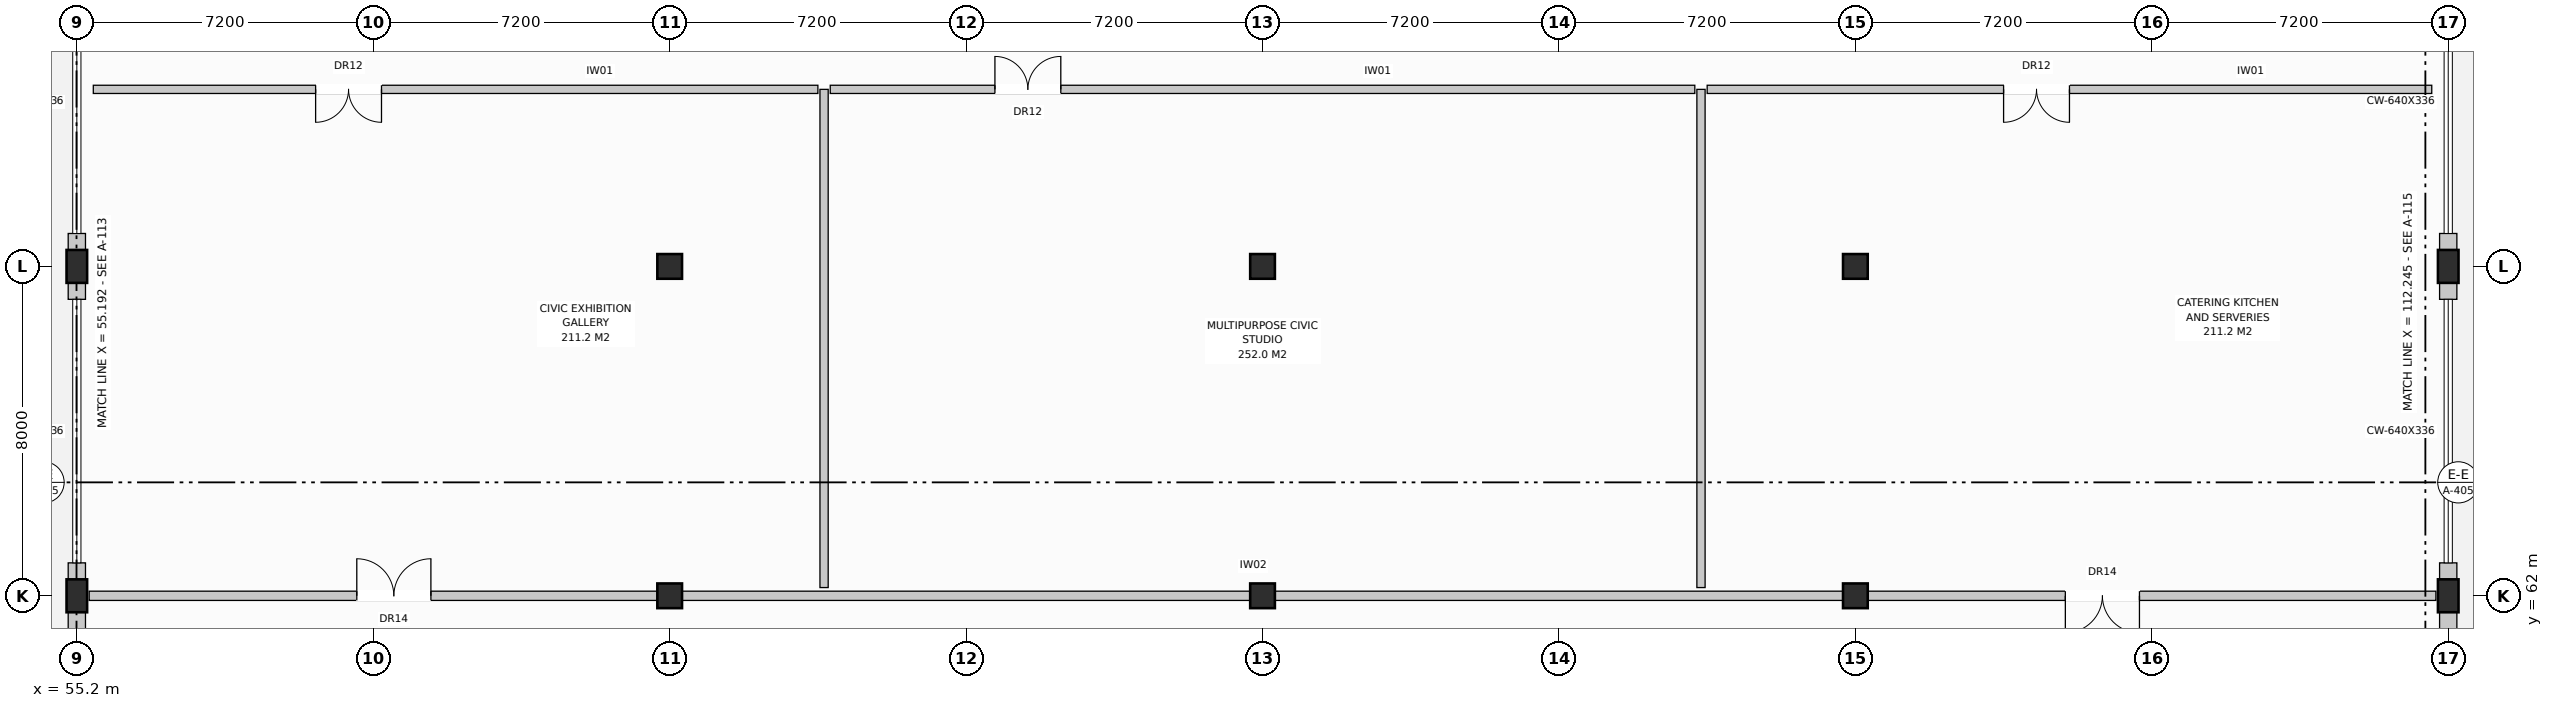
"""IFC4 building model, lengths in metres.
Left out: names, types, materials, properties, quantities, classifications, styles, units other than length and angle.
Written with IfcOpenShell. Run it as: python <this file> out.ifc"""

import sys

from ifc_helpers import new_model, si_unit, direction, frame, frame_2d, origin, origin_with_axes, origin_2d, place, context, subcontext, project, spatial, rectangle, circle, extrude, element, fill, save


model = new_model("IFC4")
c1 = context("Model", 3, precision=1e-05, world=origin(), true_north=direction((0.0, 1.0)))
c2 = subcontext(c1, "Body", "Model", "MODEL_VIEW")
j1 = project(units=[si_unit("LENGTHUNIT", "METRE"), si_unit("PLANEANGLEUNIT", "RADIAN")], contexts=[c1])
p1 = place(None, origin())
s1 = spatial("IfcSite", under=j1, at=p1, CompositionType="ELEMENT")
p2 = place(p1, origin())
s2 = spatial("IfcBuilding", under=s1, at=p2, CompositionType="ELEMENT")
p3 = place(p2, origin())
s3 = spatial("IfcBuildingStorey", under=s2, at=p3, CompositionType="ELEMENT", Elevation=0.0)
for number, where, z_axis, x_axis in (
    (1, (55.2, 62.0, 0.0), (0.0, 0.0, 1.0), (1.0, 0.0, 0.0)),
    (2, (55.2, 70.0, 0.0), (0.0, 0.0, 1.0), (1.0, 0.0, 0.0)),
):
    element("IfcColumn", number, at=place(p3, frame(where, z_axis=z_axis, x_axis=x_axis)), inside=s3, PredefinedType="COLUMN", context=c2, shape_type="SweptSolid", body=[
        extrude(rectangle(XDim=0.5, YDim=0.8, at=origin_2d()), origin(), (0.0, 0.0, 1.0), 4.4),
    ])
for number, where, z_axis, x_axis in (
    (3, (69.6, 62.0, 0.0), (0.0, 0.0, 1.0), (1.0, 0.0, 0.0)),
    (4, (69.6, 70.0, 0.0), (0.0, 0.0, 1.0), (1.0, 0.0, 0.0)),
):
    element("IfcColumn", number, at=place(p3, frame(where, z_axis=z_axis, x_axis=x_axis)), inside=s3, PredefinedType="COLUMN", context=c2, shape_type="SweptSolid", body=[
        extrude(circle(Radius=0.3, at=origin_2d()), origin(), (0.0, 0.0, 1.0), 4.4),
    ])
for number, where, z_axis, x_axis in (
    (5, (84.0, 62.0, 0.0), (0.0, 0.0, 1.0), (1.0, 0.0, 0.0)),
    (6, (84.0, 70.0, 0.0), (0.0, 0.0, 1.0), (1.0, 0.0, 0.0)),
):
    element("IfcColumn", number, at=place(p3, frame(where, z_axis=z_axis, x_axis=x_axis)), inside=s3, PredefinedType="COLUMN", context=c2, shape_type="SweptSolid", body=[
        extrude(rectangle(XDim=0.6, YDim=0.6, at=origin_2d()), origin(), (0.0, 0.0, 1.0), 4.4),
    ])
for number, where, z_axis, x_axis in (
    (7, (98.4, 62.0, 0.0), (0.0, 0.0, 1.0), (1.0, 0.0, 0.0)),
    (8, (98.4, 70.0, 0.0), (0.0, 0.0, 1.0), (1.0, 0.0, 0.0)),
):
    element("IfcColumn", number, at=place(p3, frame(where, z_axis=z_axis, x_axis=x_axis)), inside=s3, PredefinedType="COLUMN", context=c2, shape_type="SweptSolid", body=[
        extrude(circle(Radius=0.3, at=origin_2d()), origin(), (0.0, 0.0, 1.0), 4.4),
    ])
for number, where, z_axis, x_axis in (
    (9, (112.8, 62.0, 0.0), (0.0, 0.0, 1.0), (1.0, 0.0, 0.0)),
    (10, (112.8, 70.0, 0.0), (0.0, 0.0, 1.0), (1.0, 0.0, 0.0)),
):
    element("IfcColumn", number, at=place(p3, frame(where, z_axis=z_axis, x_axis=x_axis)), inside=s3, PredefinedType="COLUMN", context=c2, shape_type="SweptSolid", body=[
        extrude(rectangle(XDim=0.5, YDim=0.8, at=origin_2d()), origin(), (0.0, 0.0, 1.0), 4.4),
    ])
p4 = place(p3, frame((55.2, 53.2, 0.0), z_axis=(0.0, 0.0, 1.0), x_axis=(0.0, 1.0, 0.0)))
e11 = element("IfcWall", 11, at=p4, inside=s3, PredefinedType="STANDARD", context=c2, shape_type="SweptSolid", body=[
    extrude(rectangle(XDim=8.8, YDim=0.42, at=frame_2d((4.4, 0.0))), origin(), (0.0, 0.0, 1.0), 3.36),
])
p5 = place(p4, frame((3.8, 0.0, 0.0)))
e12 = element("IfcOpeningElement", 12, at=p5, cuts=e11, PredefinedType="OPENING", context=c2, shape_type="SweptSolid", body=[
    extrude(rectangle(XDim=2.0, YDim=2.45, at=frame_2d((1.0, 1.225))), frame((0.0, 0.222, 0.0), z_axis=(0.0, -1.0, 0.0), x_axis=(1.0, 0.0, 0.0)), (0.0, 0.0, 1.0), 0.444),
])
p6 = place(p3, frame((55.2, 62.0, 0.0), z_axis=(0.0, 0.0, 1.0), x_axis=(0.0, 1.0, 0.0)))
e13 = element("IfcWall", 13, at=p6, inside=s3, PredefinedType="STANDARD", context=c2, shape_type="SweptSolid", body=[
    extrude(rectangle(XDim=0.8, YDim=0.42, at=frame_2d((0.4, 0.0))), origin(), (0.0, 0.0, 1.0), 3.36),
])
p7 = place(p3, frame((55.2, 69.2, 0.0), z_axis=(0.0, 0.0, 1.0), x_axis=(0.0, 1.0, 0.0)))
e14 = element("IfcWall", 14, at=p7, inside=s3, PredefinedType="STANDARD", context=c2, shape_type="SweptSolid", body=[
    extrude(rectangle(XDim=1.6, YDim=0.42, at=frame_2d((0.8, 0.0))), origin(), (0.0, 0.0, 1.0), 3.36),
])
p8 = place(p3, frame((112.8, 53.2, 0.0), z_axis=(0.0, 0.0, 1.0), x_axis=(0.0, 1.0, 0.0)))
e15 = element("IfcWall", 15, at=p8, inside=s3, PredefinedType="STANDARD", context=c2, shape_type="SweptSolid", body=[
    extrude(rectangle(XDim=8.8, YDim=0.42, at=frame_2d((4.4, 0.0))), origin(), (0.0, 0.0, 1.0), 3.36),
])
p9 = place(p8, frame((3.8, 0.0, 0.0)))
e16 = element("IfcOpeningElement", 16, at=p9, cuts=e15, PredefinedType="OPENING", context=c2, shape_type="SweptSolid", body=[
    extrude(rectangle(XDim=2.0, YDim=2.45, at=frame_2d((1.0, 1.225))), frame((0.0, 0.222, 0.0), z_axis=(0.0, -1.0, 0.0), x_axis=(1.0, 0.0, 0.0)), (0.0, 0.0, 1.0), 0.444),
])
p10 = place(p3, frame((112.8, 62.0, 0.0), z_axis=(0.0, 0.0, 1.0), x_axis=(0.0, 1.0, 0.0)))
e17 = element("IfcWall", 17, at=p10, inside=s3, PredefinedType="STANDARD", context=c2, shape_type="SweptSolid", body=[
    extrude(rectangle(XDim=0.8, YDim=0.42, at=frame_2d((0.4, 0.0))), origin(), (0.0, 0.0, 1.0), 3.36),
])
p11 = place(p3, frame((112.8, 69.2, 0.0), z_axis=(0.0, 0.0, 1.0), x_axis=(0.0, 1.0, 0.0)))
e18 = element("IfcWall", 18, at=p11, inside=s3, PredefinedType="STANDARD", context=c2, shape_type="SweptSolid", body=[
    extrude(rectangle(XDim=1.6, YDim=0.42, at=frame_2d((0.8, 0.0))), origin(), (0.0, 0.0, 1.0), 3.36),
])
p12 = place(p3, frame((55.6, 74.3, 0.0), z_axis=(0.0, 0.0, 1.0), x_axis=(1.0, 0.0, 0.0)))
e19 = element("IfcWall", 19, at=p12, inside=s3, PredefinedType="PARTITIONING", context=c2, shape_type="SweptSolid", body=[
    extrude(rectangle(XDim=17.6, YDim=0.2, at=frame_2d((8.8, 0.0))), origin(), (0.0, 0.0, 1.0), 4.12),
])
p13 = place(p12, frame((5.4, 0.0, 0.0)))
e20 = element("IfcOpeningElement", 20, at=p13, cuts=e19, PredefinedType="OPENING", context=c2, shape_type="SweptSolid", body=[
    extrude(rectangle(XDim=1.6, YDim=2.2, at=frame_2d((0.8, 1.1))), frame((0.0, 0.112, 0.0), z_axis=(0.0, -1.0, 0.0), x_axis=(1.0, 0.0, 0.0)), (0.0, 0.0, 1.0), 0.224),
])
p14 = place(p3, frame((73.5, 74.3, 0.0), z_axis=(0.0, 0.0, 1.0), x_axis=(1.0, 0.0, 0.0)))
e21 = element("IfcWall", 21, at=p14, inside=s3, PredefinedType="PARTITIONING", context=c2, shape_type="SweptSolid", body=[
    extrude(rectangle(XDim=21.0, YDim=0.2, at=frame_2d((10.5, 0.0))), origin(), (0.0, 0.0, 1.0), 4.12),
])
p15 = place(p14, frame((4.0, 0.0, 0.0)))
e22 = element("IfcOpeningElement", 22, at=p15, cuts=e21, PredefinedType="OPENING", context=c2, shape_type="SweptSolid", body=[
    extrude(rectangle(XDim=1.6, YDim=2.2, at=frame_2d((0.8, 1.1))), frame((0.0, 0.112, 0.0), z_axis=(0.0, -1.0, 0.0), x_axis=(1.0, 0.0, 0.0)), (0.0, 0.0, 1.0), 0.224),
])
p16 = place(p3, frame((94.8, 74.3, 0.0), z_axis=(0.0, 0.0, 1.0), x_axis=(1.0, 0.0, 0.0)))
e23 = element("IfcWall", 23, at=p16, inside=s3, PredefinedType="PARTITIONING", context=c2, shape_type="SweptSolid", body=[
    extrude(rectangle(XDim=17.6, YDim=0.2, at=frame_2d((8.8, 0.0))), origin(), (0.0, 0.0, 1.0), 4.12),
])
p17 = place(p16, frame((7.2, 0.0, 0.0)))
e24 = element("IfcOpeningElement", 24, at=p17, cuts=e23, PredefinedType="OPENING", context=c2, shape_type="SweptSolid", body=[
    extrude(rectangle(XDim=1.6, YDim=2.2, at=frame_2d((0.8, 1.1))), frame((0.0, 0.112, 0.0), z_axis=(0.0, -1.0, 0.0), x_axis=(1.0, 0.0, 0.0)), (0.0, 0.0, 1.0), 0.224),
])
for number, where, z_axis, x_axis in (
    (25, (73.35, 62.2, 0.0), (0.0, 0.0, 1.0), (0.0, 1.0, 0.0)),
    (26, (94.65, 62.2, 0.0), (0.0, 0.0, 1.0), (0.0, 1.0, 0.0)),
):
    element("IfcWall", number, at=place(p3, frame(where, z_axis=z_axis, x_axis=x_axis)), inside=s3, PredefinedType="PARTITIONING", context=c2, shape_type="SweptSolid", body=[
        extrude(rectangle(XDim=12.1, YDim=0.2, at=frame_2d((6.05, 0.0))), origin(), (0.0, 0.0, 1.0), 4.12),
    ])
p18 = place(p3, frame((55.5, 62.0, 0.0), z_axis=(0.0, 0.0, 1.0), x_axis=(1.0, 0.0, 0.0)))
e27 = element("IfcWall", 27, at=p18, inside=s3, PredefinedType="PARTITIONING", context=c2, shape_type="SweptSolid", body=[
    extrude(rectangle(XDim=57.0, YDim=0.225, at=frame_2d((28.5, 0.0))), origin(), (0.0, 0.0, 1.0), 3.21),
])
p19 = place(p18, frame((6.5, 0.0, 0.0)))
e28 = element("IfcOpeningElement", 28, at=p19, cuts=e27, PredefinedType="OPENING", context=c2, shape_type="SweptSolid", body=[
    extrude(rectangle(XDim=1.8, YDim=2.3, at=frame_2d((0.9, 1.15))), frame((0.0, 0.125, 0.0), z_axis=(0.0, -1.0, 0.0), x_axis=(1.0, 0.0, 0.0)), (0.0, 0.0, 1.0), 0.249),
])
p20 = place(p18, frame((48.0, 0.0, 0.0)))
e29 = element("IfcOpeningElement", 29, at=p20, cuts=e27, PredefinedType="OPENING", context=c2, shape_type="SweptSolid", body=[
    extrude(rectangle(XDim=1.8, YDim=2.3, at=frame_2d((0.9, 1.15))), frame((0.0, 0.125, 0.0), z_axis=(0.0, -1.0, 0.0), x_axis=(1.0, 0.0, 0.0)), (0.0, 0.0, 1.0), 0.249),
])
p21 = place(p13, frame((1.6, 0.0, 0.0), z_axis=(0.0, 0.0, 1.0), x_axis=(-1.0, 0.0, 0.0)))
e30 = element("IfcDoor", 30, at=p21, inside=s3, OperationType="DOUBLE_DOOR_SINGLE_SWING", PredefinedType="DOOR", context=c2, shape_type="SweptSolid", body=[
    extrude(rectangle(XDim=1.6, YDim=2.2, at=frame_2d((0.8, 1.1))), frame((0.0, 0.025, 0.0), z_axis=(0.0, -1.0, 0.0), x_axis=(1.0, 0.0, 0.0)), (0.0, 0.0, 1.0), 0.05),
])
fill(e20, e30)
p22 = place(p15, origin_with_axes())
e31 = element("IfcDoor", 31, at=p22, inside=s3, OperationType="DOUBLE_DOOR_SINGLE_SWING", PredefinedType="DOOR", context=c2, shape_type="SweptSolid", body=[
    extrude(rectangle(XDim=1.6, YDim=2.2, at=frame_2d((0.8, 1.1))), frame((0.0, 0.025, 0.0), z_axis=(0.0, -1.0, 0.0), x_axis=(1.0, 0.0, 0.0)), (0.0, 0.0, 1.0), 0.05),
])
fill(e22, e31)
p23 = place(p17, frame((1.6, 0.0, 0.0), z_axis=(0.0, 0.0, 1.0), x_axis=(-1.0, 0.0, 0.0)))
e32 = element("IfcDoor", 32, at=p23, inside=s3, OperationType="DOUBLE_DOOR_SINGLE_SWING", PredefinedType="DOOR", context=c2, shape_type="SweptSolid", body=[
    extrude(rectangle(XDim=1.6, YDim=2.2, at=frame_2d((0.8, 1.1))), frame((0.0, 0.025, 0.0), z_axis=(0.0, -1.0, 0.0), x_axis=(1.0, 0.0, 0.0)), (0.0, 0.0, 1.0), 0.05),
])
fill(e24, e32)
p24 = place(p19, origin_with_axes())
e33 = element("IfcDoor", 33, at=p24, inside=s3, OperationType="DOUBLE_DOOR_SINGLE_SWING", PredefinedType="DOOR", context=c2, shape_type="SweptSolid", body=[
    extrude(rectangle(XDim=1.8, YDim=2.3, at=frame_2d((0.9, 1.15))), frame((0.0, 0.025, 0.0), z_axis=(0.0, -1.0, 0.0), x_axis=(1.0, 0.0, 0.0)), (0.0, 0.0, 1.0), 0.05),
])
fill(e28, e33)
p25 = place(p20, frame((1.8, 0.0, 0.0), z_axis=(0.0, 0.0, 1.0), x_axis=(-1.0, 0.0, 0.0)))
e34 = element("IfcDoor", 34, at=p25, inside=s3, OperationType="DOUBLE_DOOR_SINGLE_SWING", PredefinedType="DOOR", context=c2, shape_type="SweptSolid", body=[
    extrude(rectangle(XDim=1.8, YDim=2.3, at=frame_2d((0.9, 1.15))), frame((0.0, 0.025, 0.0), z_axis=(0.0, -1.0, 0.0), x_axis=(1.0, 0.0, 0.0)), (0.0, 0.0, 1.0), 0.05),
])
fill(e29, e34)
save(model, sys.argv[1])
